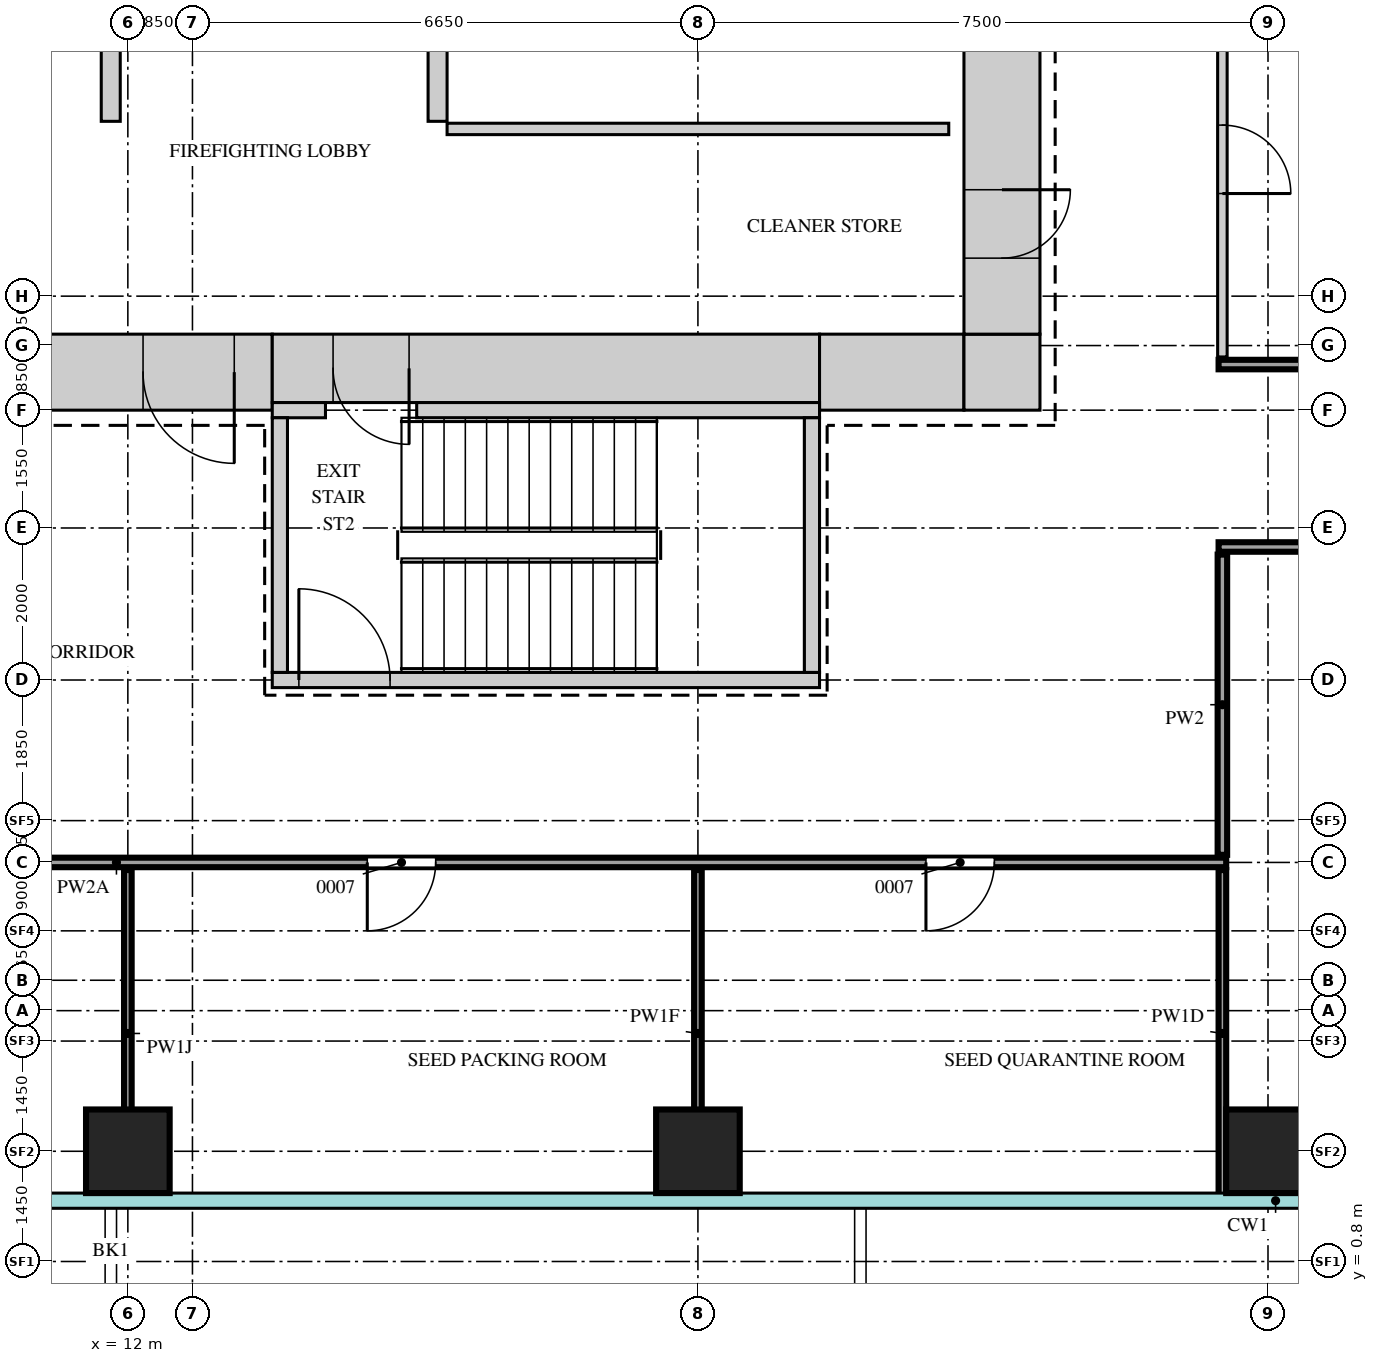
"""IFC4 building model, lengths in metres.
Left out: names, types, materials, properties, quantities, classifications, styles, units other than length and angle.
Written with IfcOpenShell. Run it as: python <this file> out.ifc"""

import sys

from ifc_helpers import new_model, si_unit, direction, frame, frame_2d, origin, origin_2d, place, context, subcontext, project, spatial, rectangle, extrude, source, transform, mapped, element, fill, save


model = new_model("IFC4")
c1 = context("Model", 3, precision=1e-05, world=origin(), true_north=direction((0.0, 1.0)))
c2 = subcontext(c1, "Body", "Model", "MODEL_VIEW")
j1 = project(units=[si_unit("LENGTHUNIT", "METRE"), si_unit("PLANEANGLEUNIT", "RADIAN")], contexts=[c1])
p1 = place(None, origin())
s1 = spatial("IfcSite", under=j1, at=p1, CompositionType="ELEMENT")
p2 = place(p1, origin())
s2 = spatial("IfcBuilding", under=s1, at=p2, CompositionType="ELEMENT")
p3 = place(p2, frame((0.0, 0.0, 105.9)))
s3 = spatial("IfcBuildingStorey", under=s2, at=p3, CompositionType="ELEMENT", Elevation=105.9)
m1 = source(origin(), c2, "Body", "SweptSolid", [
    extrude(rectangle(XDim=6.9, YDim=1.0, at=frame_2d((3.45, 0.0))), origin(), (0.0, 0.0, 1.0), 4.1),
])
p4 = place(p3, frame((7.0, 12.5, 0.0), z_axis=(0.0, 0.0, 1.0), x_axis=(1.0, 0.0, 0.0)))
e1 = element("IfcWall", 1, at=p4, inside=s3, PredefinedType="SHEAR", context=c2, shape_type="MappedRepresentation", body=[
    mapped(m1, transform((0.0, 0.0, 0.0))),
])
m2 = source(origin(), c2, "Body", "SweptSolid", [
    extrude(rectangle(XDim=1.2, YDim=2.1, at=frame_2d((0.6, 1.05))), frame((0.0, 0.51, 0.0), z_axis=(0.0, -1.0, 0.0), x_axis=(1.0, 0.0, 0.0)), (0.0, 0.0, 1.0), 1.02),
])
p5 = place(p4, frame((5.2, 0.0, 0.0)))
e2 = element("IfcOpeningElement", 2, at=p5, cuts=e1, PredefinedType="OPENING", context=c2, shape_type="MappedRepresentation", body=[
    mapped(m2, transform((0.0, 0.0, 0.0))),
])
p6 = place(p4, frame((1.85, 0.0, 0.0)))
e3 = element("IfcOpeningElement", 3, at=p6, cuts=e1, PredefinedType="OPENING", context=c2, shape_type="MappedRepresentation", body=[
    mapped(m2, transform((0.0, 0.0, 0.0))),
])
m3 = source(origin(), c2, "Body", "SweptSolid", [
    extrude(rectangle(XDim=7.2, YDim=0.9, at=frame_2d((3.6, 0.0))), origin(), (0.0, 0.0, 1.0), 4.1),
])
p7 = place(p3, frame((13.9, 12.55, 0.0), z_axis=(0.0, 0.0, 1.0), x_axis=(1.0, 0.0, 0.0)))
e4 = element("IfcWall", 4, at=p7, inside=s3, PredefinedType="SHEAR", context=c2, shape_type="MappedRepresentation", body=[
    mapped(m3, transform((0.0, 0.0, 0.0))),
])
m4 = source(origin(), c2, "Body", "SweptSolid", [
    extrude(rectangle(XDim=1.0, YDim=2.1, at=frame_2d((0.5, 1.05))), frame((0.0, 0.46, 0.0), z_axis=(0.0, -1.0, 0.0), x_axis=(1.0, 0.0, 0.0)), (0.0, 0.0, 1.0), 0.92),
])
p8 = place(p7, frame((0.8, 0.0, 0.0)))
e5 = element("IfcOpeningElement", 5, at=p8, cuts=e4, PredefinedType="OPENING", context=c2, shape_type="MappedRepresentation", body=[
    mapped(m4, transform((0.0, 0.0, 0.0))),
])
m5 = source(origin(), c2, "Body", "SweptSolid", [
    extrude(rectangle(XDim=1.9, YDim=1.0, at=frame_2d((0.95, 0.0))), origin(), (0.0, 0.0, 1.0), 4.1),
])
p9 = place(p3, frame((21.1, 12.5, 0.0), z_axis=(0.0, 0.0, 1.0), x_axis=(1.0, 0.0, 0.0)))
e6 = element("IfcWall", 6, at=p9, inside=s3, PredefinedType="SHEAR", context=c2, shape_type="MappedRepresentation", body=[
    mapped(m5, transform((0.0, 0.0, 0.0))),
])
m6 = source(origin(), c2, "Body", "SweptSolid", [
    extrude(rectangle(XDim=1.0, YDim=1.0, at=frame_2d((0.5, 0.0))), origin(), (0.0, 0.0, 1.0), 4.1),
])
p10 = place(p3, frame((23.0, 12.5, 0.0), z_axis=(0.0, 0.0, 1.0), x_axis=(1.0, 0.0, 0.0)))
e7 = element("IfcWall", 7, at=p10, inside=s3, PredefinedType="SHEAR", context=c2, shape_type="MappedRepresentation", body=[
    mapped(m6, transform((0.0, 0.0, 0.0))),
])
m7 = source(origin(), c2, "Body", "SweptSolid", [
    extrude(rectangle(XDim=28.0, YDim=1.0, at=frame_2d((14.0, 0.0))), origin(), (0.0, 0.0, 1.0), 4.1),
])
p11 = place(p3, frame((23.5, 13.0, 0.0), z_axis=(0.0, 0.0, 1.0), x_axis=(0.0, 1.0, 0.0)))
e8 = element("IfcWall", 8, at=p11, inside=s3, PredefinedType="SHEAR", context=c2, shape_type="MappedRepresentation", body=[
    mapped(m7, transform((0.0, 0.0, 0.0))),
])
m8 = source(origin(), c2, "Body", "SweptSolid", [
    extrude(rectangle(XDim=1.8, YDim=2.1, at=frame_2d((0.9, 1.05))), frame((0.0, 0.51, 0.0), z_axis=(0.0, -1.0, 0.0), x_axis=(1.0, 0.0, 0.0)), (0.0, 0.0, 1.0), 1.02),
])
p12 = place(p11, frame((22.6, 0.0, 0.0)))
e9 = element("IfcOpeningElement", 9, at=p12, cuts=e8, PredefinedType="OPENING", context=c2, shape_type="MappedRepresentation", body=[
    mapped(m8, transform((0.0, 0.0, 0.0))),
])
p13 = place(p11, frame((13.85, 0.0, 0.0)))
e10 = element("IfcOpeningElement", 10, at=p13, cuts=e8, PredefinedType="OPENING", context=c2, shape_type="MappedRepresentation", body=[
    mapped(m2, transform((0.0, 0.0, 0.0))),
])
m9 = source(origin(), c2, "Body", "SweptSolid", [
    extrude(rectangle(XDim=0.9, YDim=2.1, at=frame_2d((0.45, 1.05))), frame((0.0, 0.51, 0.0), z_axis=(0.0, -1.0, 0.0), x_axis=(1.0, 0.0, 0.0)), (0.0, 0.0, 1.0), 1.02),
])
p14 = place(p11, frame((1.0, 0.0, 0.0)))
e11 = element("IfcOpeningElement", 11, at=p14, cuts=e8, PredefinedType="OPENING", context=c2, shape_type="MappedRepresentation", body=[
    mapped(m9, transform((0.0, 0.0, 0.0))),
])
p15 = place(p11, frame((4.0, 0.0, 0.0)))
e12 = element("IfcOpeningElement", 12, at=p15, cuts=e8, PredefinedType="OPENING", context=c2, shape_type="MappedRepresentation", body=[
    mapped(m9, transform((0.0, 0.0, 0.0))),
])
p16 = place(p11, frame((7.6, 0.0, 0.0)))
e13 = element("IfcOpeningElement", 13, at=p16, cuts=e8, PredefinedType="OPENING", context=c2, shape_type="MappedRepresentation", body=[
    mapped(m9, transform((0.0, 0.0, 0.0))),
])
m10 = source(origin(), c2, "Body", "SweptSolid", [
    extrude(rectangle(XDim=0.7, YDim=0.2, at=frame_2d((0.35, 0.0))), origin(), (0.0, 0.0, 1.0), 4.1),
])
p17 = place(p3, frame((13.9, 12.0, 0.0), z_axis=(0.0, 0.0, 1.0), x_axis=(1.0, 0.0, 0.0)))
e14 = element("IfcWall", 14, at=p17, inside=s3, PredefinedType="SHEAR", context=c2, shape_type="MappedRepresentation", body=[
    mapped(m10, transform((0.0, 0.0, 0.0))),
])
m11 = source(origin(), c2, "Body", "SweptSolid", [
    extrude(rectangle(XDim=5.3, YDim=0.2, at=frame_2d((2.65, 0.0))), origin(), (0.0, 0.0, 1.0), 4.1),
])
p18 = place(p3, frame((15.8, 12.0, 0.0), z_axis=(0.0, 0.0, 1.0), x_axis=(1.0, 0.0, 0.0)))
e15 = element("IfcWall", 15, at=p18, inside=s3, PredefinedType="SHEAR", context=c2, shape_type="MappedRepresentation", body=[
    mapped(m11, transform((0.0, 0.0, 0.0))),
])
m12 = source(origin(), c2, "Body", "SweptSolid", [
    extrude(rectangle(XDim=7.2, YDim=0.2, at=frame_2d((3.6, 0.0))), origin(), (0.0, 0.0, 1.0), 4.1),
])
p19 = place(p3, frame((13.9, 8.45, 0.0), z_axis=(0.0, 0.0, 1.0), x_axis=(1.0, 0.0, 0.0)))
e16 = element("IfcWall", 16, at=p19, inside=s3, PredefinedType="SHEAR", context=c2, shape_type="MappedRepresentation", body=[
    mapped(m12, transform((0.0, 0.0, 0.0))),
])
m13 = source(origin(), c2, "Body", "SweptSolid", [
    extrude(rectangle(XDim=1.2, YDim=2.1, at=frame_2d((0.6, 1.05))), frame((0.0, 0.11, 0.0), z_axis=(0.0, -1.0, 0.0), x_axis=(1.0, 0.0, 0.0)), (0.0, 0.0, 1.0), 0.22),
])
p20 = place(p19, frame((0.35, 0.0, 0.0)))
e17 = element("IfcOpeningElement", 17, at=p20, cuts=e16, PredefinedType="OPENING", context=c2, shape_type="MappedRepresentation", body=[
    mapped(m13, transform((0.0, 0.0, 0.0))),
])
m14 = source(origin(), c2, "Body", "SweptSolid", [
    extrude(rectangle(XDim=3.35, YDim=0.2, at=frame_2d((1.675, 0.0))), origin(), (0.0, 0.0, 1.0), 4.1),
])
for number, where, z_axis, x_axis in (
    (18, (21.0, 8.55, 0.0), (0.0, 0.0, 1.0), (0.0, 1.0, 0.0)),
    (19, (14.0, 8.55, 0.0), (0.0, 0.0, 1.0), (0.0, 1.0, 0.0)),
):
    element("IfcWall", number, at=place(p3, frame(where, z_axis=z_axis, x_axis=x_axis)), inside=s3, PredefinedType="SHEAR", context=c2, shape_type="MappedRepresentation", body=[
        mapped(m14, transform((0.0, 0.0, 0.0))),
    ])
m15 = source(origin(), c2, "Body", "SweptSolid", [
    extrude(rectangle(XDim=3.4, YDim=0.25, at=frame_2d((1.7, 0.0))), origin(), (0.0, 0.0, 1.0), 4.1),
])
for number, where, z_axis, x_axis in (
    (20, (16.075, 15.8, 0.0), (0.0, 0.0, 1.0), (0.0, 1.0, 0.0)),
    (21, (11.775, 15.8, 0.0), (0.0, 0.0, 1.0), (0.0, 1.0, 0.0)),
):
    element("IfcWall", number, at=place(p3, frame(where, z_axis=z_axis, x_axis=x_axis)), inside=s3, PredefinedType="STANDARD", context=c2, shape_type="MappedRepresentation", body=[
        mapped(m15, transform((0.0, 0.0, 0.0))),
    ])
m16 = source(origin(), c2, "Body", "SweptSolid", [
    extrude(rectangle(XDim=1.1, YDim=1.1, at=origin_2d()), origin(), (0.0, 0.0, 1.0), 4.1),
])
for number, where, z_axis, x_axis in (
    (22, (12.0, 2.25, 0.0), (0.0, 0.0, 1.0), (1.0, 0.0, 0.0)),
    (23, (19.5, 2.25, 0.0), (0.0, 0.0, 1.0), (1.0, 0.0, 0.0)),
    (24, (27.0, 2.25, 0.0), (0.0, 0.0, 1.0), (1.0, 0.0, 0.0)),
):
    element("IfcColumn", number, at=place(p3, frame(where, z_axis=z_axis, x_axis=x_axis)), inside=s3, PredefinedType="COLUMN", context=c2, shape_type="MappedRepresentation", body=[
        mapped(m16, transform((0.0, 0.0, 0.0))),
    ])
m17 = source(origin(), c2, "Body", "SweptSolid", [
    extrude(rectangle(XDim=4.3, YDim=0.1, at=frame_2d((2.15, 0.0))), origin(), (0.0, 0.0, 1.0), 3.65),
])
p21 = place(p3, frame((12.0, 1.65, 0.0), z_axis=(0.0, 0.0, 1.0), x_axis=(0.0, 1.0, 0.0)))
e25 = element("IfcWall", 25, at=p21, inside=s3, PredefinedType="PARTITIONING", context=c2, shape_type="MappedRepresentation", body=[
    mapped(m17, transform((0.0, 0.0, 0.0))),
])
m18 = source(origin(), c2, "Body", "SweptSolid", [
    extrude(rectangle(XDim=4.3, YDim=0.1, at=frame_2d((2.15, 0.0))), origin(), (0.0, 0.0, 1.0), 3.77),
])
p22 = place(p3, frame((19.5, 1.65, 0.0), z_axis=(0.0, 0.0, 1.0), x_axis=(0.0, 1.0, 0.0)))
e26 = element("IfcWall", 26, at=p22, inside=s3, PredefinedType="PARTITIONING", context=c2, shape_type="MappedRepresentation", body=[
    mapped(m18, transform((0.0, 0.0, 0.0))),
])
m19 = source(origin(), c2, "Body", "SweptSolid", [
    extrude(rectangle(XDim=4.3, YDim=0.1, at=frame_2d((2.15, 0.0))), origin(), (0.0, 0.0, 1.0), 4.2),
])
p23 = place(p3, frame((26.4, 1.65, 0.0), z_axis=(0.0, 0.0, 1.0), x_axis=(0.0, 1.0, 0.0)))
e27 = element("IfcWall", 27, at=p23, inside=s3, PredefinedType="PARTITIONING", context=c2, shape_type="MappedRepresentation", body=[
    mapped(m19, transform((0.0, 0.0, 0.0))),
])
m20 = source(origin(), c2, "Body", "SweptSolid", [
    extrude(rectangle(XDim=22.3, YDim=0.125, at=frame_2d((11.15, 0.0))), origin(), (0.0, 0.0, 1.0), 3.55),
])
p24 = place(p3, frame((4.15, 6.05, 0.0), z_axis=(0.0, 0.0, 1.0), x_axis=(1.0, 0.0, 0.0)))
e28 = element("IfcWall", 28, at=p24, inside=s3, PredefinedType="PARTITIONING", context=c2, shape_type="MappedRepresentation", body=[
    mapped(m20, transform((0.0, 0.0, 0.0))),
])
m21 = source(origin(), c2, "Body", "SweptSolid", [
    extrude(rectangle(XDim=0.9, YDim=2.1, at=frame_2d((0.45, 1.05))), frame((0.0, 0.073, 0.0), z_axis=(0.0, -1.0, 0.0), x_axis=(1.0, 0.0, 0.0)), (0.0, 0.0, 1.0), 0.145),
])
p25 = place(p24, frame((3.5, 0.0, 0.0)))
e29 = element("IfcOpeningElement", 29, at=p25, cuts=e28, PredefinedType="OPENING", context=c2, shape_type="MappedRepresentation", body=[
    mapped(m21, transform((0.0, 0.0, 0.0))),
])
p26 = place(p24, frame((11.0, 0.0, 0.0)))
e30 = element("IfcOpeningElement", 30, at=p26, cuts=e28, PredefinedType="OPENING", context=c2, shape_type="MappedRepresentation", body=[
    mapped(m21, transform((0.0, 0.0, 0.0))),
])
p27 = place(p24, frame((18.35, 0.0, 0.0)))
e31 = element("IfcOpeningElement", 31, at=p27, cuts=e28, PredefinedType="OPENING", context=c2, shape_type="MappedRepresentation", body=[
    mapped(m21, transform((0.0, 0.0, 0.0))),
])
m22 = source(origin(), c2, "Body", "SweptSolid", [
    extrude(rectangle(XDim=3.95, YDim=0.125, at=frame_2d((1.975, 0.0))), origin(), (0.0, 0.0, 1.0), 4.2),
])
p28 = place(p3, frame((26.4, 6.15, 0.0), z_axis=(0.0, 0.0, 1.0), x_axis=(0.0, 1.0, 0.0)))
e32 = element("IfcWall", 32, at=p28, inside=s3, PredefinedType="PARTITIONING", context=c2, shape_type="MappedRepresentation", body=[
    mapped(m22, transform((0.0, 0.0, 0.0))),
])
m23 = source(origin(), c2, "Body", "SweptSolid", [
    extrude(rectangle(XDim=20.0, YDim=0.125, at=frame_2d((10.0, 0.0))), origin(), (0.0, 0.0, 1.0), 4.2),
])
p29 = place(p3, frame((26.35, 10.2, 0.0), z_axis=(0.0, 0.0, 1.0), x_axis=(1.0, 0.0, 0.0)))
e33 = element("IfcWall", 33, at=p29, inside=s3, PredefinedType="PARTITIONING", context=c2, shape_type="MappedRepresentation", body=[
    mapped(m23, transform((0.0, 0.0, 0.0))),
])
p30 = place(p29, frame((3.8, 0.0, 0.0)))
e34 = element("IfcOpeningElement", 34, at=p30, cuts=e33, PredefinedType="OPENING", context=c2, shape_type="MappedRepresentation", body=[
    mapped(m21, transform((0.0, 0.0, 0.0))),
])
p31 = place(p29, frame((11.3, 0.0, 0.0)))
e35 = element("IfcOpeningElement", 35, at=p31, cuts=e33, PredefinedType="OPENING", context=c2, shape_type="MappedRepresentation", body=[
    mapped(m21, transform((0.0, 0.0, 0.0))),
])
m24 = source(origin(), c2, "Body", "SweptSolid", [
    extrude(rectangle(XDim=1.2, YDim=2.1, at=frame_2d((0.6, 1.05))), frame((0.0, 0.073, 0.0), z_axis=(0.0, -1.0, 0.0), x_axis=(1.0, 0.0, 0.0)), (0.0, 0.0, 1.0), 0.145),
])
p32 = place(p29, frame((18.4, 0.0, 0.0)))
e36 = element("IfcOpeningElement", 36, at=p32, cuts=e33, PredefinedType="OPENING", context=c2, shape_type="MappedRepresentation", body=[
    mapped(m24, transform((0.0, 0.0, 0.0))),
])
m25 = source(origin(), c2, "Body", "SweptSolid", [
    extrude(rectangle(XDim=17.7, YDim=0.125, at=frame_2d((8.85, 0.0))), origin(), (0.0, 0.0, 1.0), 4.2),
])
p33 = place(p3, frame((26.35, 12.6, 0.0), z_axis=(0.0, 0.0, 1.0), x_axis=(1.0, 0.0, 0.0)))
e37 = element("IfcWall", 37, at=p33, inside=s3, PredefinedType="PARTITIONING", context=c2, shape_type="MappedRepresentation", body=[
    mapped(m25, transform((0.0, 0.0, 0.0))),
])
m26 = source(origin(), c2, "Body", "SweptSolid", [
    extrude(rectangle(XDim=23.2, YDim=0.125, at=frame_2d((11.6, 0.0))), origin(), (0.0, 0.0, 1.0), 4.2),
])
p34 = place(p3, frame((26.4, 12.7, 0.0), z_axis=(0.0, 0.0, 1.0), x_axis=(0.0, 1.0, 0.0)))
e38 = element("IfcWall", 38, at=p34, inside=s3, PredefinedType="PARTITIONING", context=c2, shape_type="MappedRepresentation", body=[
    mapped(m26, transform((0.0, 0.0, 0.0))),
])
p35 = place(p34, frame((2.15, 0.0, 0.0)))
e39 = element("IfcOpeningElement", 39, at=p35, cuts=e38, PredefinedType="OPENING", context=c2, shape_type="MappedRepresentation", body=[
    mapped(m21, transform((0.0, 0.0, 0.0))),
])
p36 = place(p34, frame((18.2, 0.0, 0.0)))
e40 = element("IfcOpeningElement", 40, at=p36, cuts=e38, PredefinedType="OPENING", context=c2, shape_type="MappedRepresentation", body=[
    mapped(m24, transform((0.0, 0.0, 0.0))),
])
m27 = source(origin(), c2, "Body", "SweptSolid", [
    extrude(rectangle(XDim=6.6, YDim=0.15, at=frame_2d((3.3, 0.0))), origin(), (0.0, 0.0, 1.0), 4.2),
])
p37 = place(p3, frame((16.2, 15.7, 0.0), z_axis=(0.0, 0.0, 1.0), x_axis=(1.0, 0.0, 0.0)))
e41 = element("IfcWall", 41, at=p37, inside=s3, PredefinedType="PARTITIONING", context=c2, shape_type="MappedRepresentation", body=[
    mapped(m27, transform((0.0, 0.0, 0.0))),
])
m28 = source(origin(), c2, "Body", "SweptSolid", [
    extrude(rectangle(XDim=0.9, YDim=2.1, at=frame_2d((0.45, 1.05))), frame((0.0, 0.45, 0.0), z_axis=(0.0, -1.0, 0.0), x_axis=(1.0, 0.0, 0.0)), (0.0, 0.0, 1.0), 0.9),
])
p38 = place(p14, origin())
e42 = element("IfcDoor", 42, at=p38, inside=s3, OperationType="SINGLE_SWING_RIGHT", PredefinedType="DOOR", context=c2, shape_type="MappedRepresentation", body=[
    mapped(m28, transform((0.0, 0.0, 0.0))),
])
fill(e11, e42)
m29 = source(origin(), c2, "Body", "SweptSolid", [
    extrude(rectangle(XDim=1.2, YDim=2.1, at=frame_2d((0.6, 1.05))), frame((0.0, 0.45, 0.0), z_axis=(0.0, -1.0, 0.0), x_axis=(1.0, 0.0, 0.0)), (0.0, 0.0, 1.0), 0.9),
])
p39 = place(p5, origin())
e43 = element("IfcDoor", 43, at=p39, inside=s3, OperationType="SINGLE_SWING_RIGHT", PredefinedType="DOOR", context=c2, shape_type="MappedRepresentation", body=[
    mapped(m29, transform((0.0, 0.0, 0.0))),
])
fill(e2, e43)
m30 = source(origin(), c2, "Body", "SweptSolid", [
    extrude(rectangle(XDim=1.0, YDim=2.1, at=frame_2d((0.5, 1.05))), frame((0.0, 0.4, 0.0), z_axis=(0.0, -1.0, 0.0), x_axis=(1.0, 0.0, 0.0)), (0.0, 0.0, 1.0), 0.8),
])
p40 = place(p8, origin())
e44 = element("IfcDoor", 44, at=p40, inside=s3, OperationType="SINGLE_SWING_RIGHT", PredefinedType="DOOR", context=c2, shape_type="MappedRepresentation", body=[
    mapped(m30, transform((0.0, 0.0, 0.0))),
])
fill(e5, e44)
m31 = source(origin(), c2, "Body", "SweptSolid", [
    extrude(rectangle(XDim=0.9, YDim=2.1, at=frame_2d((0.45, 1.05))), frame((0.0, 0.025, 0.0), z_axis=(0.0, -1.0, 0.0), x_axis=(1.0, 0.0, 0.0)), (0.0, 0.0, 1.0), 0.05),
])
p41 = place(p26, origin())
e45 = element("IfcDoor", 45, at=p41, inside=s3, OperationType="SINGLE_SWING_LEFT", PredefinedType="DOOR", context=c2, shape_type="MappedRepresentation", body=[
    mapped(m31, transform((0.0, 0.0, 0.0))),
])
fill(e30, e45)
p42 = place(p27, origin())
e46 = element("IfcDoor", 46, at=p42, inside=s3, OperationType="SINGLE_SWING_LEFT", PredefinedType="DOOR", context=c2, shape_type="MappedRepresentation", body=[
    mapped(m31, transform((0.0, 0.0, 0.0))),
])
fill(e31, e46)
p43 = place(p35, origin())
e47 = element("IfcDoor", 47, at=p43, inside=s3, OperationType="SINGLE_SWING_LEFT", PredefinedType="DOOR", context=c2, shape_type="MappedRepresentation", body=[
    mapped(m31, transform((0.0, 0.0, 0.0))),
])
fill(e39, e47)
m32 = source(origin(), c2, "Body", "SweptSolid", [
    extrude(rectangle(XDim=1.2, YDim=2.1, at=frame_2d((0.6, 1.05))), frame((0.0, 0.025, 0.0), z_axis=(0.0, -1.0, 0.0), x_axis=(1.0, 0.0, 0.0)), (0.0, 0.0, 1.0), 0.05),
])
p44 = place(p20, origin())
e48 = element("IfcDoor", 48, at=p44, inside=s3, OperationType="SINGLE_SWING_RIGHT", PredefinedType="DOOR", context=c2, shape_type="MappedRepresentation", body=[
    mapped(m32, transform((0.0, 0.0, 0.0))),
])
fill(e17, e48)
save(model, sys.argv[1])
